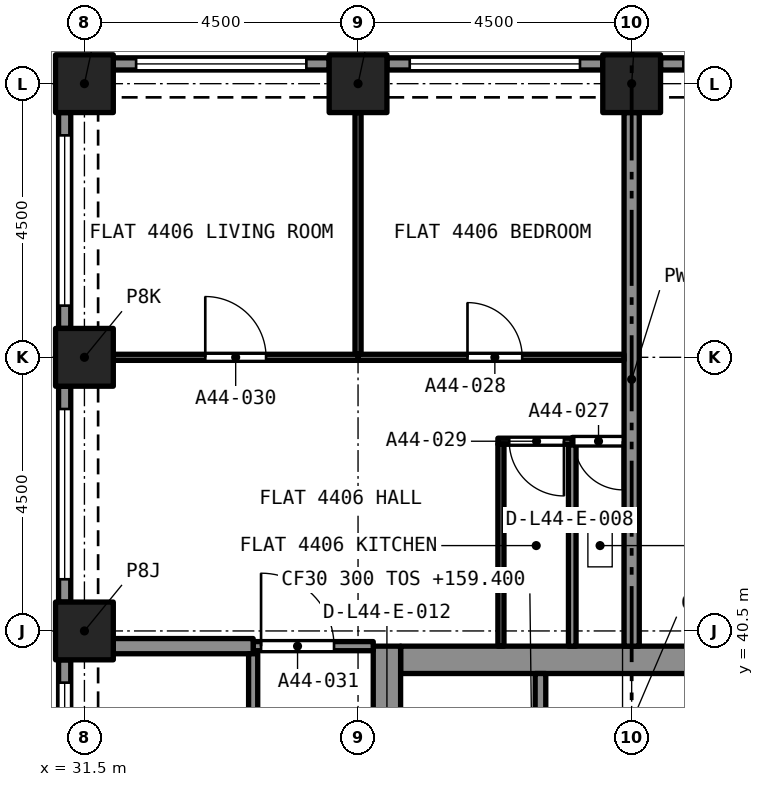
"""IFC4 building model, lengths in metres.
Left out: names, types, materials, properties, quantities, classifications, styles, units other than length and angle.
Written with IfcOpenShell. Run it as: python <this file> out.ifc"""

import sys

from ifc_helpers import new_model, si_unit, direction, frame, frame_2d, origin, origin_2d, place, context, subcontext, project, spatial, rectangle, extrude, element, fill, save


model = new_model("IFC4")
c1 = context("Model", 3, precision=1e-05, world=origin(), true_north=direction((0.0, 1.0)))
c2 = subcontext(c1, "Body", "Model", "MODEL_VIEW")
j1 = project(units=[si_unit("LENGTHUNIT", "METRE"), si_unit("PLANEANGLEUNIT", "RADIAN")], contexts=[c1])
p1 = place(None, origin())
s1 = spatial("IfcSite", under=j1, at=p1, CompositionType="ELEMENT")
p2 = place(p1, origin())
s2 = spatial("IfcBuilding", under=s1, at=p2, CompositionType="ELEMENT")
p3 = place(p2, frame((0.0, 0.0, 159.4)))
s3 = spatial("IfcBuildingStorey", under=s2, at=p3, CompositionType="ELEMENT", Elevation=159.4)
for number, where, z_axis, x_axis in (
    (1, (31.5, 40.5, 0.0), (0.0, 0.0, 1.0), (1.0, 0.0, 0.0)),
    (2, (31.5, 45.0, 0.0), (0.0, 0.0, 1.0), (1.0, 0.0, 0.0)),
    (3, (31.5, 49.5, 0.0), (0.0, 0.0, 1.0), (1.0, 0.0, 0.0)),
    (4, (36.0, 49.5, 0.0), (0.0, 0.0, 1.0), (1.0, 0.0, 0.0)),
    (5, (40.5, 49.5, 0.0), (0.0, 0.0, 1.0), (1.0, 0.0, 0.0)),
):
    element("IfcColumn", number, at=place(p3, frame(where, z_axis=z_axis, x_axis=x_axis)), inside=s3, PredefinedType="COLUMN", context=c2, shape_type="SweptSolid", body=[
        extrude(rectangle(XDim=0.95, YDim=0.95, at=origin_2d()), origin(), (0.0, 0.0, 1.0), 4.4),
    ])
p4 = place(p3, frame((36.7, 40.025, 0.0), z_axis=(0.0, 0.0, 1.0), x_axis=(1.0, 0.0, 0.0)))
e6 = element("IfcWall", 6, at=p4, inside=s3, PredefinedType="SOLIDWALL", context=c2, shape_type="SweptSolid", body=[
    extrude(rectangle(XDim=7.6, YDim=0.45, at=frame_2d((3.8, 0.0))), origin(), (0.0, 0.0, 1.0), 4.4),
])
p5 = place(p3, frame((36.475, 27.25, 0.0), z_axis=(0.0, 0.0, 1.0), x_axis=(0.0, 1.0, 0.0)))
e7 = element("IfcWall", 7, at=p5, inside=s3, PredefinedType="SOLIDWALL", context=c2, shape_type="SweptSolid", body=[
    extrude(rectangle(XDim=13.0, YDim=0.45, at=frame_2d((6.5, 0.0))), origin(), (0.0, 0.0, 1.0), 4.4),
])
p6 = place(p5, frame((8.7, 0.0, 0.0)))
e8 = element("IfcOpeningElement", 8, at=p6, cuts=e7, PredefinedType="OPENING", context=c2, shape_type="SweptSolid", body=[
    extrude(rectangle(XDim=1.2, YDim=2.1, at=frame_2d((0.6, 1.05))), frame((0.0, 0.235, 0.0), z_axis=(0.0, -1.0, 0.0), x_axis=(1.0, 0.0, 0.0)), (0.0, 0.0, 1.0), 0.47),
])
p7 = place(p3, frame((40.975, 49.825, 0.0), z_axis=(0.0, 0.0, 1.0), x_axis=(1.0, 0.0, 0.0)))
e9 = element("IfcWall", 9, at=p7, inside=s3, PredefinedType="SOLIDWALL", context=c2, shape_type="SweptSolid", body=[
    extrude(rectangle(XDim=3.55, YDim=0.2, at=frame_2d((1.775, 0.0))), origin(), (0.0, 0.0, 1.0), 4.4),
])
p8 = place(p7, frame((0.375, 0.0, 0.45)))
e10 = element("IfcOpeningElement", 10, at=p8, cuts=e9, PredefinedType="OPENING", context=c2, shape_type="SweptSolid", body=[
    extrude(rectangle(XDim=2.8, YDim=2.55, at=frame_2d((1.4, 1.275))), frame((0.0, 0.11, 0.0), z_axis=(0.0, -1.0, 0.0), x_axis=(1.0, 0.0, 0.0)), (0.0, 0.0, 1.0), 0.22),
])
p9 = place(p3, frame((36.475, 49.825, 0.0), z_axis=(0.0, 0.0, 1.0), x_axis=(1.0, 0.0, 0.0)))
e11 = element("IfcWall", 11, at=p9, inside=s3, PredefinedType="SOLIDWALL", context=c2, shape_type="SweptSolid", body=[
    extrude(rectangle(XDim=3.55, YDim=0.2, at=frame_2d((1.775, 0.0))), origin(), (0.0, 0.0, 1.0), 4.4),
])
p10 = place(p9, frame((0.375, 0.0, 0.45)))
e12 = element("IfcOpeningElement", 12, at=p10, cuts=e11, PredefinedType="OPENING", context=c2, shape_type="SweptSolid", body=[
    extrude(rectangle(XDim=2.8, YDim=2.55, at=frame_2d((1.4, 1.275))), frame((0.0, 0.11, 0.0), z_axis=(0.0, -1.0, 0.0), x_axis=(1.0, 0.0, 0.0)), (0.0, 0.0, 1.0), 0.22),
])
p11 = place(p3, frame((31.975, 49.825, 0.0), z_axis=(0.0, 0.0, 1.0), x_axis=(1.0, 0.0, 0.0)))
e13 = element("IfcWall", 13, at=p11, inside=s3, PredefinedType="SOLIDWALL", context=c2, shape_type="SweptSolid", body=[
    extrude(rectangle(XDim=3.55, YDim=0.2, at=frame_2d((1.775, 0.0))), origin(), (0.0, 0.0, 1.0), 4.4),
])
p12 = place(p11, frame((0.375, 0.0, 0.45)))
e14 = element("IfcOpeningElement", 14, at=p12, cuts=e13, PredefinedType="OPENING", context=c2, shape_type="SweptSolid", body=[
    extrude(rectangle(XDim=2.8, YDim=2.55, at=frame_2d((1.4, 1.275))), frame((0.0, 0.11, 0.0), z_axis=(0.0, -1.0, 0.0), x_axis=(1.0, 0.0, 0.0)), (0.0, 0.0, 1.0), 0.22),
])
p13 = place(p3, frame((31.175, 45.475, 0.0), z_axis=(0.0, 0.0, 1.0), x_axis=(0.0, 1.0, 0.0)))
e15 = element("IfcWall", 15, at=p13, inside=s3, PredefinedType="SOLIDWALL", context=c2, shape_type="SweptSolid", body=[
    extrude(rectangle(XDim=3.55, YDim=0.2, at=frame_2d((1.775, 0.0))), origin(), (0.0, 0.0, 1.0), 4.4),
])
p14 = place(p13, frame((0.375, 0.0, 0.45)))
e16 = element("IfcOpeningElement", 16, at=p14, cuts=e15, PredefinedType="OPENING", context=c2, shape_type="SweptSolid", body=[
    extrude(rectangle(XDim=2.8, YDim=2.55, at=frame_2d((1.4, 1.275))), frame((0.0, 0.11, 0.0), z_axis=(0.0, -1.0, 0.0), x_axis=(1.0, 0.0, 0.0)), (0.0, 0.0, 1.0), 0.22),
])
p15 = place(p3, frame((31.175, 40.975, 0.0), z_axis=(0.0, 0.0, 1.0), x_axis=(0.0, 1.0, 0.0)))
e17 = element("IfcWall", 17, at=p15, inside=s3, PredefinedType="SOLIDWALL", context=c2, shape_type="SweptSolid", body=[
    extrude(rectangle(XDim=3.55, YDim=0.2, at=frame_2d((1.775, 0.0))), origin(), (0.0, 0.0, 1.0), 4.4),
])
p16 = place(p15, frame((0.375, 0.0, 0.45)))
e18 = element("IfcOpeningElement", 18, at=p16, cuts=e17, PredefinedType="OPENING", context=c2, shape_type="SweptSolid", body=[
    extrude(rectangle(XDim=2.8, YDim=2.55, at=frame_2d((1.4, 1.275))), frame((0.0, 0.11, 0.0), z_axis=(0.0, -1.0, 0.0), x_axis=(1.0, 0.0, 0.0)), (0.0, 0.0, 1.0), 0.22),
])
p17 = place(p3, frame((31.175, 36.475, 0.0), z_axis=(0.0, 0.0, 1.0), x_axis=(0.0, 1.0, 0.0)))
e19 = element("IfcWall", 19, at=p17, inside=s3, PredefinedType="SOLIDWALL", context=c2, shape_type="SweptSolid", body=[
    extrude(rectangle(XDim=3.55, YDim=0.2, at=frame_2d((1.775, 0.0))), origin(), (0.0, 0.0, 1.0), 4.4),
])
p18 = place(p17, frame((0.375, 0.0, 0.45)))
e20 = element("IfcOpeningElement", 20, at=p18, cuts=e19, PredefinedType="OPENING", context=c2, shape_type="SweptSolid", body=[
    extrude(rectangle(XDim=2.8, YDim=2.55, at=frame_2d((1.4, 1.275))), frame((0.0, 0.11, 0.0), z_axis=(0.0, -1.0, 0.0), x_axis=(1.0, 0.0, 0.0)), (0.0, 0.0, 1.0), 0.22),
])
p19 = place(p3, frame((40.375, 43.62, 0.0), z_axis=(0.0, 0.0, 1.0), x_axis=(-1.0, 0.0, 0.0)))
e21 = element("IfcWall", 21, at=p19, inside=s3, PredefinedType="PARTITIONING", context=c2, shape_type="SweptSolid", body=[
    extrude(rectangle(XDim=0.852, YDim=0.125, at=frame_2d((0.426, 0.0))), origin(), (0.0, 0.0, 1.0), 4.1),
])
p20 = place(p19, frame((0.02, 0.0, 0.0)))
e22 = element("IfcOpeningElement", 22, at=p20, cuts=e21, PredefinedType="OPENING", context=c2, shape_type="SweptSolid", body=[
    extrude(rectangle(XDim=0.8, YDim=2.1, at=frame_2d((0.4, 1.05))), frame((0.0, 0.073, 0.0), z_axis=(0.0, -1.0, 0.0), x_axis=(1.0, 0.0, 0.0)), (0.0, 0.0, 1.0), 0.145),
])
p21 = place(p3, frame((39.523, 40.25, 0.0), z_axis=(0.0, 0.0, 1.0), x_axis=(0.0, 1.0, 0.0)))
e23 = element("IfcWall", 23, at=p21, inside=s3, PredefinedType="PARTITIONING", context=c2, shape_type="SweptSolid", body=[
    extrude(rectangle(XDim=3.308, YDim=0.125, at=frame_2d((1.654, 0.0))), origin(), (0.0, 0.0, 1.0), 4.1),
])
p22 = place(p3, frame((40.5, 40.25, 0.0), z_axis=(0.0, 0.0, 1.0), x_axis=(0.0, 1.0, 0.0)))
e24 = element("IfcWall", 24, at=p22, inside=s3, PredefinedType="PARTITIONING", context=c2, shape_type="SweptSolid", body=[
    extrude(rectangle(XDim=8.775, YDim=0.25, at=frame_2d((4.387, 0.0))), origin(), (0.0, 0.0, 1.0), 4.1),
])
p23 = place(p3, frame((36.0, 45.0, 0.0), z_axis=(0.0, 0.0, 1.0), x_axis=(1.0, 0.0, 0.0)))
e25 = element("IfcWall", 25, at=p23, inside=s3, PredefinedType="PARTITIONING", context=c2, shape_type="SweptSolid", body=[
    extrude(rectangle(XDim=4.375, YDim=0.1, at=frame_2d((2.188, 0.0))), origin(), (0.0, 0.0, 1.0), 4.1),
])
p24 = place(p23, frame((1.8, 0.0, 0.0)))
e26 = element("IfcOpeningElement", 26, at=p24, cuts=e25, PredefinedType="OPENING", context=c2, shape_type="SweptSolid", body=[
    extrude(rectangle(XDim=0.9, YDim=2.1, at=frame_2d((0.45, 1.05))), frame((0.0, 0.06, 0.0), z_axis=(0.0, -1.0, 0.0), x_axis=(1.0, 0.0, 0.0)), (0.0, 0.0, 1.0), 0.12),
])
p25 = place(p3, frame((36.0, 45.05, 0.0), z_axis=(0.0, 0.0, 1.0), x_axis=(0.0, 1.0, 0.0)))
e27 = element("IfcWall", 27, at=p25, inside=s3, PredefinedType="PARTITIONING", context=c2, shape_type="SweptSolid", body=[
    extrude(rectangle(XDim=3.975, YDim=0.1, at=frame_2d((1.987, 0.0))), origin(), (0.0, 0.0, 1.0), 4.1),
])
p26 = place(p3, frame((39.523, 43.62, 0.0), z_axis=(0.0, 0.0, 1.0), x_axis=(-1.0, 0.0, 0.0)))
e28 = element("IfcWall", 28, at=p26, inside=s3, PredefinedType="PARTITIONING", context=c2, shape_type="SweptSolid", body=[
    extrude(rectangle(XDim=1.223, YDim=0.1, at=frame_2d((0.611, 0.0))), origin(), (0.0, 0.0, 1.0), 4.1),
])
p27 = place(p26, frame((0.136, 0.0, 0.0)))
e29 = element("IfcOpeningElement", 29, at=p27, cuts=e28, PredefinedType="OPENING", context=c2, shape_type="SweptSolid", body=[
    extrude(rectangle(XDim=0.9, YDim=2.1, at=frame_2d((0.45, 1.05))), frame((0.0, 0.06, 0.0), z_axis=(0.0, -1.0, 0.0), x_axis=(1.0, 0.0, 0.0)), (0.0, 0.0, 1.0), 0.12),
])
p28 = place(p3, frame((38.35, 40.25, 0.0), z_axis=(0.0, 0.0, 1.0), x_axis=(0.0, 1.0, 0.0)))
e30 = element("IfcWall", 30, at=p28, inside=s3, PredefinedType="PARTITIONING", context=c2, shape_type="SweptSolid", body=[
    extrude(rectangle(XDim=3.32, YDim=0.1, at=frame_2d((1.66, 0.0))), origin(), (0.0, 0.0, 1.0), 4.1),
])
p29 = place(p3, frame((31.975, 45.0, 0.0), z_axis=(0.0, 0.0, 1.0), x_axis=(1.0, 0.0, 0.0)))
e31 = element("IfcWall", 31, at=p29, inside=s3, PredefinedType="PARTITIONING", context=c2, shape_type="SweptSolid", body=[
    extrude(rectangle(XDim=4.025, YDim=0.1, at=frame_2d((2.012, 0.0))), origin(), (0.0, 0.0, 1.0), 4.1),
])
p30 = place(p29, frame((1.512, 0.0, 0.0)))
e32 = element("IfcOpeningElement", 32, at=p30, cuts=e31, PredefinedType="OPENING", context=c2, shape_type="SweptSolid", body=[
    extrude(rectangle(XDim=1.0, YDim=2.1, at=frame_2d((0.5, 1.05))), frame((0.0, 0.06, 0.0), z_axis=(0.0, -1.0, 0.0), x_axis=(1.0, 0.0, 0.0)), (0.0, 0.0, 1.0), 0.12),
])
p31 = place(p3, frame((34.275, 40.25, 0.0), z_axis=(0.0, 0.0, 1.0), x_axis=(1.0, 0.0, 0.0)))
e33 = element("IfcWall", 33, at=p31, inside=s3, PredefinedType="PARTITIONING", context=c2, shape_type="SweptSolid", body=[
    extrude(rectangle(XDim=1.975, YDim=0.15, at=frame_2d((0.988, 0.0))), origin(), (0.0, 0.0, 1.0), 4.1),
])
p32 = place(p31, frame((0.13, 0.0, 0.0)))
e34 = element("IfcOpeningElement", 34, at=p32, cuts=e33, PredefinedType="OPENING", context=c2, shape_type="SweptSolid", body=[
    extrude(rectangle(XDim=1.2, YDim=2.4, at=frame_2d((0.6, 1.2))), frame((0.0, 0.085, 0.0), z_axis=(0.0, -1.0, 0.0), x_axis=(1.0, 0.0, 0.0)), (0.0, 0.0, 1.0), 0.17),
])
p33 = place(p3, frame((31.975, 40.25, 0.0), z_axis=(0.0, 0.0, 1.0), x_axis=(1.0, 0.0, 0.0)))
e35 = element("IfcWall", 35, at=p33, inside=s3, PredefinedType="PARTITIONING", context=c2, shape_type="SweptSolid", body=[
    extrude(rectangle(XDim=2.3, YDim=0.25, at=frame_2d((1.15, 0.0))), origin(), (0.0, 0.0, 1.0), 4.1),
])
p34 = place(p3, frame((34.275, 36.0, 0.0), z_axis=(0.0, 0.0, 1.0), x_axis=(0.0, 1.0, 0.0)))
e36 = element("IfcWall", 36, at=p34, inside=s3, PredefinedType="PARTITIONING", context=c2, shape_type="SweptSolid", body=[
    extrude(rectangle(XDim=4.125, YDim=0.15, at=frame_2d((2.062, 0.0))), origin(), (0.0, 0.0, 1.0), 4.1),
])
p35 = place(p34, frame((1.625, 0.0, 0.0)))
e37 = element("IfcOpeningElement", 37, at=p35, cuts=e36, PredefinedType="OPENING", context=c2, shape_type="SweptSolid", body=[
    extrude(rectangle(XDim=1.0, YDim=2.1, at=frame_2d((0.5, 1.05))), frame((0.0, 0.085, 0.0), z_axis=(0.0, -1.0, 0.0), x_axis=(1.0, 0.0, 0.0)), (0.0, 0.0, 1.0), 0.17),
])
p36 = place(p3, frame((39.0, 37.5, 0.0), z_axis=(0.0, 0.0, 1.0), x_axis=(0.0, 1.0, 0.0)))
e38 = element("IfcWall", 38, at=p36, inside=s3, PredefinedType="SOLIDWALL", context=c2, shape_type="SweptSolid", body=[
    extrude(rectangle(XDim=2.3, YDim=0.175, at=frame_2d((1.15, 0.0))), origin(), (0.0, 0.0, 1.0), 4.1),
])
p37 = place(p8, origin())
e39 = element("IfcWindow", 39, at=p37, inside=s3, PartitioningType="SINGLE_PANEL", PredefinedType="WINDOW", context=c2, shape_type="SweptSolid", body=[
    extrude(rectangle(XDim=2.8, YDim=2.55, at=frame_2d((1.4, 1.275))), frame((0.0, 0.03, 0.0), z_axis=(0.0, -1.0, 0.0), x_axis=(1.0, 0.0, 0.0)), (0.0, 0.0, 1.0), 0.06),
])
fill(e10, e39)
p38 = place(p10, origin())
e40 = element("IfcWindow", 40, at=p38, inside=s3, PartitioningType="SINGLE_PANEL", PredefinedType="WINDOW", context=c2, shape_type="SweptSolid", body=[
    extrude(rectangle(XDim=2.8, YDim=2.55, at=frame_2d((1.4, 1.275))), frame((0.0, 0.03, 0.0), z_axis=(0.0, -1.0, 0.0), x_axis=(1.0, 0.0, 0.0)), (0.0, 0.0, 1.0), 0.06),
])
fill(e12, e40)
p39 = place(p12, origin())
e41 = element("IfcWindow", 41, at=p39, inside=s3, PartitioningType="SINGLE_PANEL", PredefinedType="WINDOW", context=c2, shape_type="SweptSolid", body=[
    extrude(rectangle(XDim=2.8, YDim=2.55, at=frame_2d((1.4, 1.275))), frame((0.0, 0.03, 0.0), z_axis=(0.0, -1.0, 0.0), x_axis=(1.0, 0.0, 0.0)), (0.0, 0.0, 1.0), 0.06),
])
fill(e14, e41)
p40 = place(p14, origin())
e42 = element("IfcWindow", 42, at=p40, inside=s3, PartitioningType="SINGLE_PANEL", PredefinedType="WINDOW", context=c2, shape_type="SweptSolid", body=[
    extrude(rectangle(XDim=2.8, YDim=2.55, at=frame_2d((1.4, 1.275))), frame((0.0, 0.03, 0.0), z_axis=(0.0, -1.0, 0.0), x_axis=(1.0, 0.0, 0.0)), (0.0, 0.0, 1.0), 0.06),
])
fill(e16, e42)
p41 = place(p16, origin())
e43 = element("IfcWindow", 43, at=p41, inside=s3, PartitioningType="SINGLE_PANEL", PredefinedType="WINDOW", context=c2, shape_type="SweptSolid", body=[
    extrude(rectangle(XDim=2.8, YDim=2.55, at=frame_2d((1.4, 1.275))), frame((0.0, 0.03, 0.0), z_axis=(0.0, -1.0, 0.0), x_axis=(1.0, 0.0, 0.0)), (0.0, 0.0, 1.0), 0.06),
])
fill(e18, e43)
p42 = place(p18, origin())
e44 = element("IfcWindow", 44, at=p42, inside=s3, PartitioningType="SINGLE_PANEL", PredefinedType="WINDOW", context=c2, shape_type="SweptSolid", body=[
    extrude(rectangle(XDim=2.8, YDim=2.55, at=frame_2d((1.4, 1.275))), frame((0.0, 0.03, 0.0), z_axis=(0.0, -1.0, 0.0), x_axis=(1.0, 0.0, 0.0)), (0.0, 0.0, 1.0), 0.06),
])
fill(e20, e44)
p43 = place(p20, origin())
e45 = element("IfcDoor", 45, at=p43, inside=s3, OperationType="SINGLE_SWING_LEFT", PredefinedType="DOOR", context=c2, shape_type="SweptSolid", body=[
    extrude(rectangle(XDim=0.8, YDim=2.1, at=frame_2d((0.4, 1.05))), frame((0.0, 0.025, 0.0), z_axis=(0.0, -1.0, 0.0), x_axis=(1.0, 0.0, 0.0)), (0.0, 0.0, 1.0), 0.05),
])
fill(e22, e45)
p44 = place(p24, origin())
e46 = element("IfcDoor", 46, at=p44, inside=s3, OperationType="SINGLE_SWING_RIGHT", PredefinedType="DOOR", context=c2, shape_type="SweptSolid", body=[
    extrude(rectangle(XDim=0.9, YDim=2.1, at=frame_2d((0.45, 1.05))), frame((0.0, 0.025, 0.0), z_axis=(0.0, -1.0, 0.0), x_axis=(1.0, 0.0, 0.0)), (0.0, 0.0, 1.0), 0.05),
])
fill(e26, e46)
p45 = place(p27, origin())
e47 = element("IfcDoor", 47, at=p45, inside=s3, OperationType="SINGLE_SWING_LEFT", PredefinedType="DOOR", context=c2, shape_type="SweptSolid", body=[
    extrude(rectangle(XDim=0.9, YDim=2.1, at=frame_2d((0.45, 1.05))), frame((0.0, 0.025, 0.0), z_axis=(0.0, -1.0, 0.0), x_axis=(1.0, 0.0, 0.0)), (0.0, 0.0, 1.0), 0.05),
])
fill(e29, e47)
p46 = place(p30, origin())
e48 = element("IfcDoor", 48, at=p46, inside=s3, OperationType="SINGLE_SWING_LEFT", PredefinedType="DOOR", context=c2, shape_type="SweptSolid", body=[
    extrude(rectangle(XDim=1.0, YDim=2.1, at=frame_2d((0.5, 1.05))), frame((0.0, 0.025, 0.0), z_axis=(0.0, -1.0, 0.0), x_axis=(1.0, 0.0, 0.0)), (0.0, 0.0, 1.0), 0.05),
])
fill(e32, e48)
p47 = place(p32, origin())
e49 = element("IfcDoor", 49, at=p47, inside=s3, OperationType="SINGLE_SWING_LEFT", PredefinedType="DOOR", context=c2, shape_type="SweptSolid", body=[
    extrude(rectangle(XDim=1.2, YDim=2.4, at=frame_2d((0.6, 1.2))), frame((0.0, 0.025, 0.0), z_axis=(0.0, -1.0, 0.0), x_axis=(1.0, 0.0, 0.0)), (0.0, 0.0, 1.0), 0.05),
])
fill(e34, e49)
save(model, sys.argv[1])
